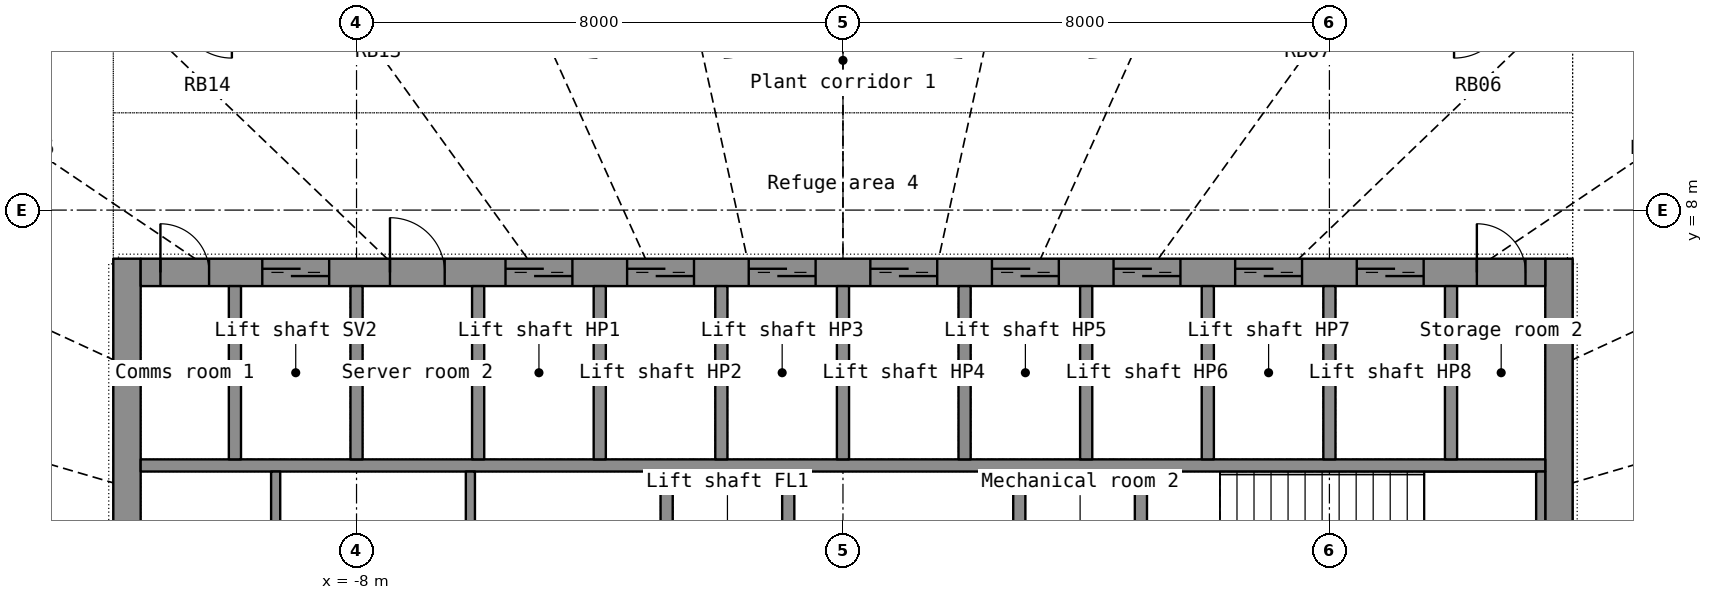
"""IFC4 building model, lengths in metres.
Left out: names, types, materials, properties, quantities, classifications, styles, units other than length and angle.
Written with IfcOpenShell. Run it as: python <this file> out.ifc"""

import sys

from ifc_helpers import new_model, si_unit, direction, frame, frame_2d, origin, place, context, subcontext, project, spatial, rectangle, extrude, element, fill, save


model = new_model("IFC4")
c1 = context("Model", 3, precision=1e-05, world=origin(), true_north=direction((0.0, 1.0)))
c2 = subcontext(c1, "Body", "Model", "MODEL_VIEW")
j1 = project(units=[si_unit("LENGTHUNIT", "METRE"), si_unit("PLANEANGLEUNIT", "RADIAN")], contexts=[c1])
p1 = place(None, origin())
s1 = spatial("IfcSite", under=j1, at=p1, CompositionType="ELEMENT")
p2 = place(p1, origin())
s2 = spatial("IfcBuilding", under=s1, at=p2, CompositionType="ELEMENT")
p3 = place(p2, frame((0.0, 0.0, 212.6)))
s3 = spatial("IfcBuildingStorey", under=s2, at=p3, CompositionType="ELEMENT", Elevation=212.6)
p4 = place(p3, frame((-11.775, -7.2, 0.0), z_axis=(0.0, 0.0, 1.0), x_axis=(0.0, 1.0, 0.0)))
e1 = element("IfcWall", 1, at=p4, inside=s3, PredefinedType="SHEAR", context=c2, shape_type="SweptSolid", body=[
    extrude(rectangle(XDim=14.4, YDim=0.45, at=frame_2d((7.2, 0.0))), origin(), (0.0, 0.0, 1.0), 4.1),
])
p5 = place(p4, frame((6.5, 0.0, 0.0)))
e2 = element("IfcOpeningElement", 2, at=p5, cuts=e1, PredefinedType="OPENING", context=c2, shape_type="SweptSolid", body=[
    extrude(rectangle(XDim=1.4, YDim=2.2, at=frame_2d((0.7, 1.1))), frame((0.0, 0.235, 0.0), z_axis=(0.0, -1.0, 0.0), x_axis=(1.0, 0.0, 0.0)), (0.0, 0.0, 1.0), 0.47),
])
p6 = place(p3, frame((11.775, -7.2, 0.0), z_axis=(0.0, 0.0, 1.0), x_axis=(0.0, 1.0, 0.0)))
e3 = element("IfcWall", 3, at=p6, inside=s3, PredefinedType="SHEAR", context=c2, shape_type="SweptSolid", body=[
    extrude(rectangle(XDim=14.4, YDim=0.45, at=frame_2d((7.2, 0.0))), origin(), (0.0, 0.0, 1.0), 4.1),
])
p7 = place(p6, frame((6.5, 0.0, 0.0)))
e4 = element("IfcOpeningElement", 4, at=p7, cuts=e3, PredefinedType="OPENING", context=c2, shape_type="SweptSolid", body=[
    extrude(rectangle(XDim=1.4, YDim=2.2, at=frame_2d((0.7, 1.1))), frame((0.0, 0.235, 0.0), z_axis=(0.0, -1.0, 0.0), x_axis=(1.0, 0.0, 0.0)), (0.0, 0.0, 1.0), 0.47),
])
p8 = place(p3, frame((-11.55, 6.975, 0.0), z_axis=(0.0, 0.0, 1.0), x_axis=(1.0, 0.0, 0.0)))
e5 = element("IfcWall", 5, at=p8, inside=s3, PredefinedType="SHEAR", context=c2, shape_type="SweptSolid", body=[
    extrude(rectangle(XDim=23.1, YDim=0.45, at=frame_2d((11.55, 0.0))), origin(), (0.0, 0.0, 1.0), 4.1),
])
p9 = place(p8, frame((2.0, 0.0, 0.0)))
e6 = element("IfcOpeningElement", 6, at=p9, cuts=e5, PredefinedType="OPENING", context=c2, shape_type="SweptSolid", body=[
    extrude(rectangle(XDim=1.1, YDim=2.2, at=frame_2d((0.55, 1.1))), frame((0.0, 0.235, 0.0), z_axis=(0.0, -1.0, 0.0), x_axis=(1.0, 0.0, 0.0)), (0.0, 0.0, 1.0), 0.47),
])
p10 = place(p8, frame((6.0, 0.0, 0.0)))
e7 = element("IfcOpeningElement", 7, at=p10, cuts=e5, PredefinedType="OPENING", context=c2, shape_type="SweptSolid", body=[
    extrude(rectangle(XDim=1.1, YDim=2.2, at=frame_2d((0.55, 1.1))), frame((0.0, 0.235, 0.0), z_axis=(0.0, -1.0, 0.0), x_axis=(1.0, 0.0, 0.0)), (0.0, 0.0, 1.0), 0.47),
])
p11 = place(p8, frame((8.0, 0.0, 0.0)))
e8 = element("IfcOpeningElement", 8, at=p11, cuts=e5, PredefinedType="OPENING", context=c2, shape_type="SweptSolid", body=[
    extrude(rectangle(XDim=1.1, YDim=2.2, at=frame_2d((0.55, 1.1))), frame((0.0, 0.235, 0.0), z_axis=(0.0, -1.0, 0.0), x_axis=(1.0, 0.0, 0.0)), (0.0, 0.0, 1.0), 0.47),
])
p12 = place(p8, frame((10.0, 0.0, 0.0)))
e9 = element("IfcOpeningElement", 9, at=p12, cuts=e5, PredefinedType="OPENING", context=c2, shape_type="SweptSolid", body=[
    extrude(rectangle(XDim=1.1, YDim=2.2, at=frame_2d((0.55, 1.1))), frame((0.0, 0.235, 0.0), z_axis=(0.0, -1.0, 0.0), x_axis=(1.0, 0.0, 0.0)), (0.0, 0.0, 1.0), 0.47),
])
p13 = place(p8, frame((12.0, 0.0, 0.0)))
e10 = element("IfcOpeningElement", 10, at=p13, cuts=e5, PredefinedType="OPENING", context=c2, shape_type="SweptSolid", body=[
    extrude(rectangle(XDim=1.1, YDim=2.2, at=frame_2d((0.55, 1.1))), frame((0.0, 0.235, 0.0), z_axis=(0.0, -1.0, 0.0), x_axis=(1.0, 0.0, 0.0)), (0.0, 0.0, 1.0), 0.47),
])
p14 = place(p8, frame((14.0, 0.0, 0.0)))
e11 = element("IfcOpeningElement", 11, at=p14, cuts=e5, PredefinedType="OPENING", context=c2, shape_type="SweptSolid", body=[
    extrude(rectangle(XDim=1.1, YDim=2.2, at=frame_2d((0.55, 1.1))), frame((0.0, 0.235, 0.0), z_axis=(0.0, -1.0, 0.0), x_axis=(1.0, 0.0, 0.0)), (0.0, 0.0, 1.0), 0.47),
])
p15 = place(p8, frame((16.0, 0.0, 0.0)))
e12 = element("IfcOpeningElement", 12, at=p15, cuts=e5, PredefinedType="OPENING", context=c2, shape_type="SweptSolid", body=[
    extrude(rectangle(XDim=1.1, YDim=2.2, at=frame_2d((0.55, 1.1))), frame((0.0, 0.235, 0.0), z_axis=(0.0, -1.0, 0.0), x_axis=(1.0, 0.0, 0.0)), (0.0, 0.0, 1.0), 0.47),
])
p16 = place(p8, frame((18.0, 0.0, 0.0)))
e13 = element("IfcOpeningElement", 13, at=p16, cuts=e5, PredefinedType="OPENING", context=c2, shape_type="SweptSolid", body=[
    extrude(rectangle(XDim=1.1, YDim=2.2, at=frame_2d((0.55, 1.1))), frame((0.0, 0.235, 0.0), z_axis=(0.0, -1.0, 0.0), x_axis=(1.0, 0.0, 0.0)), (0.0, 0.0, 1.0), 0.47),
])
p17 = place(p8, frame((20.0, 0.0, 0.0)))
e14 = element("IfcOpeningElement", 14, at=p17, cuts=e5, PredefinedType="OPENING", context=c2, shape_type="SweptSolid", body=[
    extrude(rectangle(XDim=1.1, YDim=2.2, at=frame_2d((0.55, 1.1))), frame((0.0, 0.235, 0.0), z_axis=(0.0, -1.0, 0.0), x_axis=(1.0, 0.0, 0.0)), (0.0, 0.0, 1.0), 0.47),
])
p18 = place(p8, frame((4.1, 0.0, 0.0)))
e15 = element("IfcOpeningElement", 15, at=p18, cuts=e5, PredefinedType="OPENING", context=c2, shape_type="SweptSolid", body=[
    extrude(rectangle(XDim=0.9, YDim=2.1, at=frame_2d((0.45, 1.05))), frame((0.0, 0.235, 0.0), z_axis=(0.0, -1.0, 0.0), x_axis=(1.0, 0.0, 0.0)), (0.0, 0.0, 1.0), 0.47),
])
p19 = place(p8, frame((0.325, 0.0, 0.0)))
e16 = element("IfcOpeningElement", 16, at=p19, cuts=e5, PredefinedType="OPENING", context=c2, shape_type="SweptSolid", body=[
    extrude(rectangle(XDim=0.8, YDim=2.05, at=frame_2d((0.4, 1.025))), frame((0.0, 0.235, 0.0), z_axis=(0.0, -1.0, 0.0), x_axis=(1.0, 0.0, 0.0)), (0.0, 0.0, 1.0), 0.47),
])
p20 = place(p8, frame((21.975, 0.0, 0.0)))
e17 = element("IfcOpeningElement", 17, at=p20, cuts=e5, PredefinedType="OPENING", context=c2, shape_type="SweptSolid", body=[
    extrude(rectangle(XDim=0.8, YDim=2.05, at=frame_2d((0.4, 1.025))), frame((0.0, 0.235, 0.0), z_axis=(0.0, -1.0, 0.0), x_axis=(1.0, 0.0, 0.0)), (0.0, 0.0, 1.0), 0.47),
])
p21 = place(p3, frame((-11.55, 3.8, 0.0), z_axis=(0.0, 0.0, 1.0), x_axis=(1.0, 0.0, 0.0)))
e18 = element("IfcWall", 18, at=p21, inside=s3, PredefinedType="SHEAR", context=c2, shape_type="SweptSolid", body=[
    extrude(rectangle(XDim=23.1, YDim=0.2, at=frame_2d((11.55, 0.0))), origin(), (0.0, 0.0, 1.0), 4.1),
])
for number, where, z_axis, x_axis in (
    (19, (-10.0, 3.9, 0.0), (0.0, 0.0, 1.0), (0.0, 1.0, 0.0)),
    (20, (-8.0, 3.9, 0.0), (0.0, 0.0, 1.0), (0.0, 1.0, 0.0)),
    (21, (-6.0, 3.9, 0.0), (0.0, 0.0, 1.0), (0.0, 1.0, 0.0)),
    (22, (-4.0, 3.9, 0.0), (0.0, 0.0, 1.0), (0.0, 1.0, 0.0)),
    (23, (-2.0, 3.9, 0.0), (0.0, 0.0, 1.0), (0.0, 1.0, 0.0)),
    (24, (0.0, 3.9, 0.0), (0.0, 0.0, 1.0), (0.0, 1.0, 0.0)),
    (25, (2.0, 3.9, 0.0), (0.0, 0.0, 1.0), (0.0, 1.0, 0.0)),
    (26, (4.0, 3.9, 0.0), (0.0, 0.0, 1.0), (0.0, 1.0, 0.0)),
    (27, (6.0, 3.9, 0.0), (0.0, 0.0, 1.0), (0.0, 1.0, 0.0)),
    (28, (8.0, 3.9, 0.0), (0.0, 0.0, 1.0), (0.0, 1.0, 0.0)),
    (29, (10.0, 3.9, 0.0), (0.0, 0.0, 1.0), (0.0, 1.0, 0.0)),
):
    element("IfcWall", number, at=place(p3, frame(where, z_axis=z_axis, x_axis=x_axis)), inside=s3, PredefinedType="SHEAR", context=c2, shape_type="SweptSolid", body=[
        extrude(rectangle(XDim=2.85, YDim=0.2, at=frame_2d((1.425, 0.0))), origin(), (0.0, 0.0, 1.0), 4.1),
    ])
p22 = place(p3, frame((-2.9, -3.7, 0.0), z_axis=(0.0, 0.0, 1.0), x_axis=(0.0, 1.0, 0.0)))
e30 = element("IfcWall", 30, at=p22, inside=s3, PredefinedType="SHEAR", context=c2, shape_type="SweptSolid", body=[
    extrude(rectangle(XDim=7.4, YDim=0.2, at=frame_2d((3.7, 0.0))), origin(), (0.0, 0.0, 1.0), 4.1),
])
p23 = place(p22, frame((3.1, 0.0, 0.0)))
e31 = element("IfcOpeningElement", 31, at=p23, cuts=e30, PredefinedType="OPENING", context=c2, shape_type="SweptSolid", body=[
    extrude(rectangle(XDim=1.2, YDim=2.2, at=frame_2d((0.6, 1.1))), frame((0.0, 0.11, 0.0), z_axis=(0.0, -1.0, 0.0), x_axis=(1.0, 0.0, 0.0)), (0.0, 0.0, 1.0), 0.22),
])
p24 = place(p3, frame((2.9, -3.7, 0.0), z_axis=(0.0, 0.0, 1.0), x_axis=(0.0, 1.0, 0.0)))
e32 = element("IfcWall", 32, at=p24, inside=s3, PredefinedType="SHEAR", context=c2, shape_type="SweptSolid", body=[
    extrude(rectangle(XDim=7.4, YDim=0.2, at=frame_2d((3.7, 0.0))), origin(), (0.0, 0.0, 1.0), 4.1),
])
p25 = place(p24, frame((3.1, 0.0, 0.0)))
e33 = element("IfcOpeningElement", 33, at=p25, cuts=e32, PredefinedType="OPENING", context=c2, shape_type="SweptSolid", body=[
    extrude(rectangle(XDim=1.2, YDim=2.2, at=frame_2d((0.6, 1.1))), frame((0.0, 0.11, 0.0), z_axis=(0.0, -1.0, 0.0), x_axis=(1.0, 0.0, 0.0)), (0.0, 0.0, 1.0), 0.22),
])
p26 = place(p3, frame((-0.9, 1.35, 0.0), z_axis=(0.0, 0.0, 1.0), x_axis=(0.0, 1.0, 0.0)))
e34 = element("IfcWall", 34, at=p26, inside=s3, PredefinedType="SHEAR", context=c2, shape_type="SweptSolid", body=[
    extrude(rectangle(XDim=2.35, YDim=0.2, at=frame_2d((1.175, 0.0))), origin(), (0.0, 0.0, 1.0), 4.1),
])
p27 = place(p3, frame((11.475, 1.35, 0.0), z_axis=(0.0, 0.0, 1.0), x_axis=(0.0, 1.0, 0.0)))
e35 = element("IfcWall", 35, at=p27, inside=s3, PredefinedType="SHEAR", context=c2, shape_type="SweptSolid", body=[
    extrude(rectangle(XDim=2.35, YDim=0.15, at=frame_2d((1.175, 0.0))), origin(), (0.0, 0.0, 1.0), 4.1),
])
p28 = place(p3, frame((4.9, 1.35, 0.0), z_axis=(0.0, 0.0, 1.0), x_axis=(0.0, 1.0, 0.0)))
e36 = element("IfcWall", 36, at=p28, inside=s3, PredefinedType="SHEAR", context=c2, shape_type="SweptSolid", body=[
    extrude(rectangle(XDim=2.35, YDim=0.2, at=frame_2d((1.175, 0.0))), origin(), (0.0, 0.0, 1.0), 4.1),
])
for number, where, z_axis, x_axis in (
    (37, (-9.33, 1.35, 0.0), (0.0, 0.0, 1.0), (0.0, 1.0, 0.0)),
    (38, (-6.127, 1.35, 0.0), (0.0, 0.0, 1.0), (0.0, 1.0, 0.0)),
):
    element("IfcWall", number, at=place(p3, frame(where, z_axis=z_axis, x_axis=x_axis)), inside=s3, PredefinedType="PARTITIONING", context=c2, shape_type="SweptSolid", body=[
        extrude(rectangle(XDim=2.35, YDim=0.15, at=frame_2d((1.175, 0.0))), origin(), (0.0, 0.0, 1.0), 4.1),
    ])
p29 = place(p9, origin())
e39 = element("IfcDoor", 39, at=p29, inside=s3, OperationType="DOUBLE_DOOR_SLIDING", PredefinedType="DOOR", context=c2, shape_type="SweptSolid", body=[
    extrude(rectangle(XDim=1.1, YDim=2.2, at=frame_2d((0.55, 1.1))), frame((0.0, 0.025, 0.0), z_axis=(0.0, -1.0, 0.0), x_axis=(1.0, 0.0, 0.0)), (0.0, 0.0, 1.0), 0.05),
])
fill(e6, e39)
p30 = place(p10, origin())
e40 = element("IfcDoor", 40, at=p30, inside=s3, OperationType="DOUBLE_DOOR_SLIDING", PredefinedType="DOOR", context=c2, shape_type="SweptSolid", body=[
    extrude(rectangle(XDim=1.1, YDim=2.2, at=frame_2d((0.55, 1.1))), frame((0.0, 0.025, 0.0), z_axis=(0.0, -1.0, 0.0), x_axis=(1.0, 0.0, 0.0)), (0.0, 0.0, 1.0), 0.05),
])
fill(e7, e40)
p31 = place(p11, origin())
e41 = element("IfcDoor", 41, at=p31, inside=s3, OperationType="DOUBLE_DOOR_SLIDING", PredefinedType="DOOR", context=c2, shape_type="SweptSolid", body=[
    extrude(rectangle(XDim=1.1, YDim=2.2, at=frame_2d((0.55, 1.1))), frame((0.0, 0.025, 0.0), z_axis=(0.0, -1.0, 0.0), x_axis=(1.0, 0.0, 0.0)), (0.0, 0.0, 1.0), 0.05),
])
fill(e8, e41)
p32 = place(p12, origin())
e42 = element("IfcDoor", 42, at=p32, inside=s3, OperationType="DOUBLE_DOOR_SLIDING", PredefinedType="DOOR", context=c2, shape_type="SweptSolid", body=[
    extrude(rectangle(XDim=1.1, YDim=2.2, at=frame_2d((0.55, 1.1))), frame((0.0, 0.025, 0.0), z_axis=(0.0, -1.0, 0.0), x_axis=(1.0, 0.0, 0.0)), (0.0, 0.0, 1.0), 0.05),
])
fill(e9, e42)
p33 = place(p13, origin())
e43 = element("IfcDoor", 43, at=p33, inside=s3, OperationType="DOUBLE_DOOR_SLIDING", PredefinedType="DOOR", context=c2, shape_type="SweptSolid", body=[
    extrude(rectangle(XDim=1.1, YDim=2.2, at=frame_2d((0.55, 1.1))), frame((0.0, 0.025, 0.0), z_axis=(0.0, -1.0, 0.0), x_axis=(1.0, 0.0, 0.0)), (0.0, 0.0, 1.0), 0.05),
])
fill(e10, e43)
p34 = place(p14, origin())
e44 = element("IfcDoor", 44, at=p34, inside=s3, OperationType="DOUBLE_DOOR_SLIDING", PredefinedType="DOOR", context=c2, shape_type="SweptSolid", body=[
    extrude(rectangle(XDim=1.1, YDim=2.2, at=frame_2d((0.55, 1.1))), frame((0.0, 0.025, 0.0), z_axis=(0.0, -1.0, 0.0), x_axis=(1.0, 0.0, 0.0)), (0.0, 0.0, 1.0), 0.05),
])
fill(e11, e44)
p35 = place(p15, origin())
e45 = element("IfcDoor", 45, at=p35, inside=s3, OperationType="DOUBLE_DOOR_SLIDING", PredefinedType="DOOR", context=c2, shape_type="SweptSolid", body=[
    extrude(rectangle(XDim=1.1, YDim=2.2, at=frame_2d((0.55, 1.1))), frame((0.0, 0.025, 0.0), z_axis=(0.0, -1.0, 0.0), x_axis=(1.0, 0.0, 0.0)), (0.0, 0.0, 1.0), 0.05),
])
fill(e12, e45)
p36 = place(p16, origin())
e46 = element("IfcDoor", 46, at=p36, inside=s3, OperationType="DOUBLE_DOOR_SLIDING", PredefinedType="DOOR", context=c2, shape_type="SweptSolid", body=[
    extrude(rectangle(XDim=1.1, YDim=2.2, at=frame_2d((0.55, 1.1))), frame((0.0, 0.025, 0.0), z_axis=(0.0, -1.0, 0.0), x_axis=(1.0, 0.0, 0.0)), (0.0, 0.0, 1.0), 0.05),
])
fill(e13, e46)
p37 = place(p17, origin())
e47 = element("IfcDoor", 47, at=p37, inside=s3, OperationType="DOUBLE_DOOR_SLIDING", PredefinedType="DOOR", context=c2, shape_type="SweptSolid", body=[
    extrude(rectangle(XDim=1.1, YDim=2.2, at=frame_2d((0.55, 1.1))), frame((0.0, 0.025, 0.0), z_axis=(0.0, -1.0, 0.0), x_axis=(1.0, 0.0, 0.0)), (0.0, 0.0, 1.0), 0.05),
])
fill(e14, e47)
p38 = place(p18, origin())
e48 = element("IfcDoor", 48, at=p38, inside=s3, OperationType="SINGLE_SWING_LEFT", PredefinedType="DOOR", context=c2, shape_type="SweptSolid", body=[
    extrude(rectangle(XDim=0.9, YDim=2.1, at=frame_2d((0.45, 1.05))), frame((0.0, 0.025, 0.0), z_axis=(0.0, -1.0, 0.0), x_axis=(1.0, 0.0, 0.0)), (0.0, 0.0, 1.0), 0.05),
])
fill(e15, e48)
p39 = place(p19, origin())
e49 = element("IfcDoor", 49, at=p39, inside=s3, OperationType="SINGLE_SWING_LEFT", PredefinedType="DOOR", context=c2, shape_type="SweptSolid", body=[
    extrude(rectangle(XDim=0.8, YDim=2.05, at=frame_2d((0.4, 1.025))), frame((0.0, 0.025, 0.0), z_axis=(0.0, -1.0, 0.0), x_axis=(1.0, 0.0, 0.0)), (0.0, 0.0, 1.0), 0.05),
])
fill(e16, e49)
p40 = place(p20, origin())
e50 = element("IfcDoor", 50, at=p40, inside=s3, OperationType="SINGLE_SWING_LEFT", PredefinedType="DOOR", context=c2, shape_type="SweptSolid", body=[
    extrude(rectangle(XDim=0.8, YDim=2.05, at=frame_2d((0.4, 1.025))), frame((0.0, 0.025, 0.0), z_axis=(0.0, -1.0, 0.0), x_axis=(1.0, 0.0, 0.0)), (0.0, 0.0, 1.0), 0.05),
])
fill(e17, e50)
save(model, sys.argv[1])
